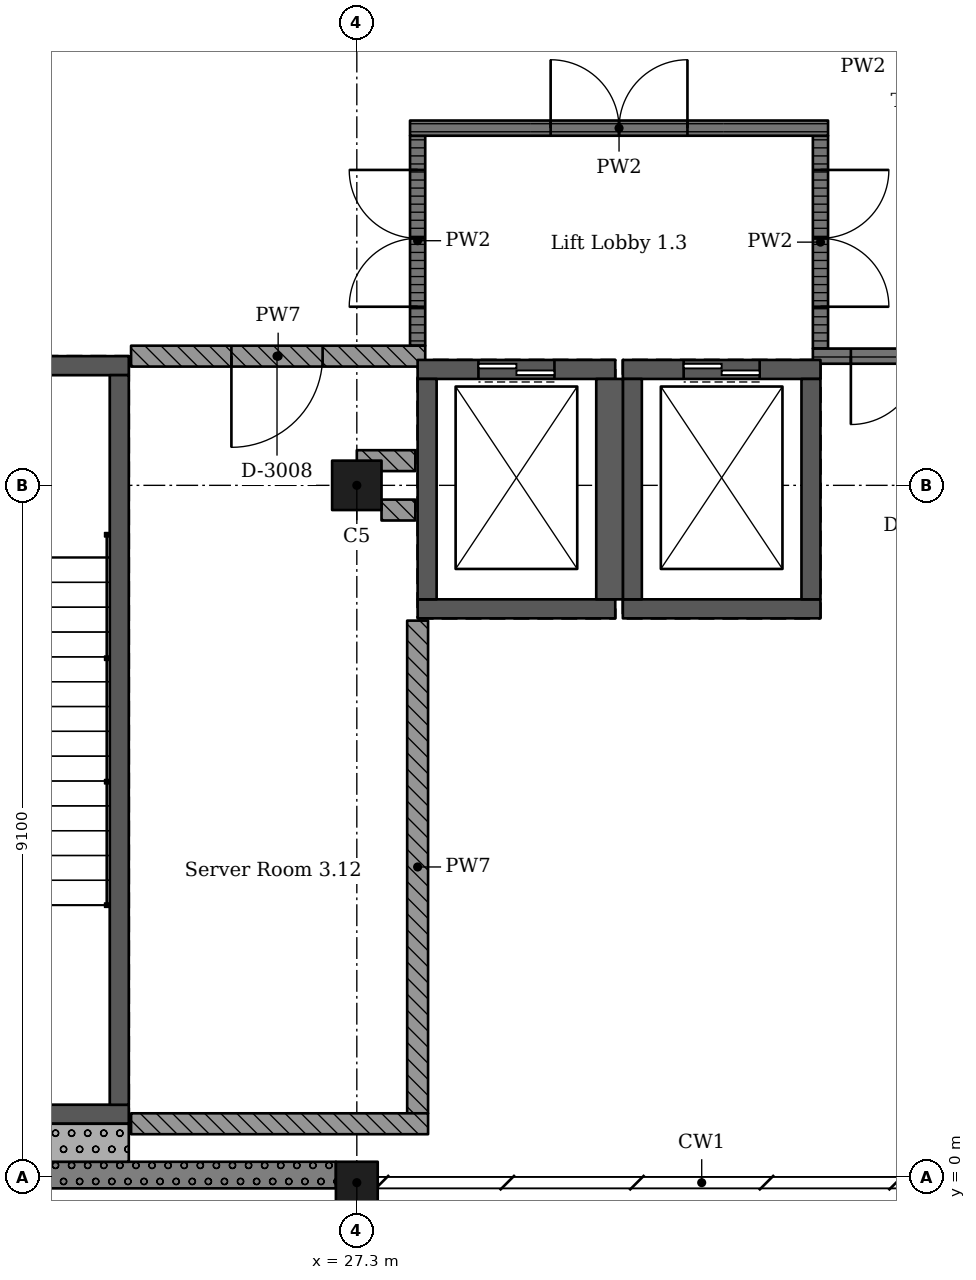
"""IFC4 building model, lengths in metres.
Left out: names, types, materials, properties, quantities, classifications, styles, units other than length and angle.
Written with IfcOpenShell. Run it as: python <this file> out.ifc"""

import sys

from ifc_helpers import new_model, si_unit, direction, frame, frame_2d, origin, origin_2d, place, context, subcontext, project, spatial, rectangle, extrude, element, fill, save


model = new_model("IFC4")
c1 = context("Model", 3, precision=1e-05, world=origin(), true_north=direction((0.0, 1.0)))
c2 = subcontext(c1, "Body", "Model", "MODEL_VIEW")
j1 = project(units=[si_unit("LENGTHUNIT", "METRE"), si_unit("PLANEANGLEUNIT", "RADIAN")], contexts=[c1])
p1 = place(None, origin())
s1 = spatial("IfcSite", under=j1, at=p1, CompositionType="ELEMENT")
p2 = place(p1, origin())
s2 = spatial("IfcBuilding", under=s1, at=p2, CompositionType="ELEMENT")
p3 = place(p2, frame((0.0, 0.0, 15.47)))
s3 = spatial("IfcBuildingStorey", under=s2, at=p3, CompositionType="ELEMENT", Elevation=15.47)
p4 = place(p3, frame((27.3, -0.075, 0.0), z_axis=(0.0, 0.0, 1.0), x_axis=(1.0, 0.0, 0.0)))
e1 = element("IfcColumn", 1, at=p4, inside=s3, PredefinedType="COLUMN", context=c2, shape_type="SweptSolid", body=[
    extrude(rectangle(XDim=0.55, YDim=0.55, at=origin_2d()), origin(), (0.0, 0.0, 1.0), 4.55),
])
p5 = place(p3, frame((27.3, 9.1, 0.0), z_axis=(0.0, 0.0, 1.0), x_axis=(1.0, 0.0, 0.0)))
e2 = element("IfcColumn", 2, at=p5, inside=s3, PredefinedType="COLUMN", context=c2, shape_type="SweptSolid", body=[
    extrude(rectangle(XDim=0.65, YDim=0.65, at=origin_2d()), origin(), (0.0, 0.0, 1.0), 4.55),
])
p6 = place(p3, frame((30.7, 7.475, 0.0), z_axis=(0.0, 0.0, 1.0), x_axis=(-1.0, 0.0, 0.0)))
e3 = element("IfcWall", 3, at=p6, inside=s3, PredefinedType="SHEAR", context=c2, shape_type="SweptSolid", body=[
    extrude(rectangle(XDim=2.6, YDim=0.25, at=frame_2d((1.3, 0.0))), origin(), (0.0, 0.0, 1.0), 4.55),
])
p7 = place(p3, frame((30.7, 10.625, 0.0), z_axis=(0.0, 0.0, 1.0), x_axis=(-1.0, 0.0, 0.0)))
e4 = element("IfcWall", 4, at=p7, inside=s3, PredefinedType="SHEAR", context=c2, shape_type="SweptSolid", body=[
    extrude(rectangle(XDim=2.6, YDim=0.25, at=frame_2d((1.3, 0.0))), origin(), (0.0, 0.0, 1.0), 4.55),
])
p8 = place(p7, frame((0.8, 0.0, 0.0)))
e5 = element("IfcOpeningElement", 5, at=p8, cuts=e4, PredefinedType="OPENING", context=c2, shape_type="SweptSolid", body=[
    extrude(rectangle(XDim=1.0, YDim=2.1, at=frame_2d((0.5, 1.05))), frame((0.0, 0.135, 0.0), z_axis=(0.0, -1.0, 0.0), x_axis=(1.0, 0.0, 0.0)), (0.0, 0.0, 1.0), 0.27),
])
p9 = place(p3, frame((28.225, 10.5, 0.0), z_axis=(0.0, 0.0, 1.0), x_axis=(0.0, -1.0, 0.0)))
e6 = element("IfcWall", 6, at=p9, inside=s3, PredefinedType="SHEAR", context=c2, shape_type="SweptSolid", body=[
    extrude(rectangle(XDim=2.9, YDim=0.25, at=frame_2d((1.45, 0.0))), origin(), (0.0, 0.0, 1.0), 4.55),
])
p10 = place(p3, frame((30.625, 10.5, 0.0), z_axis=(0.0, 0.0, 1.0), x_axis=(0.0, -1.0, 0.0)))
e7 = element("IfcWall", 7, at=p10, inside=s3, PredefinedType="SHEAR", context=c2, shape_type="SweptSolid", body=[
    extrude(rectangle(XDim=2.9, YDim=0.35, at=frame_2d((1.45, 0.0))), origin(), (0.0, 0.0, 1.0), 4.55),
])
p11 = place(p3, frame((33.4, 7.475, 0.0), z_axis=(0.0, 0.0, 1.0), x_axis=(-1.0, 0.0, 0.0)))
e8 = element("IfcWall", 8, at=p11, inside=s3, PredefinedType="SHEAR", context=c2, shape_type="SweptSolid", body=[
    extrude(rectangle(XDim=2.6, YDim=0.25, at=frame_2d((1.3, 0.0))), origin(), (0.0, 0.0, 1.0), 4.55),
])
p12 = place(p3, frame((33.4, 10.625, 0.0), z_axis=(0.0, 0.0, 1.0), x_axis=(-1.0, 0.0, 0.0)))
e9 = element("IfcWall", 9, at=p12, inside=s3, PredefinedType="SHEAR", context=c2, shape_type="SweptSolid", body=[
    extrude(rectangle(XDim=2.6, YDim=0.25, at=frame_2d((1.3, 0.0))), origin(), (0.0, 0.0, 1.0), 4.55),
])
p13 = place(p12, frame((0.8, 0.0, 0.0)))
e10 = element("IfcOpeningElement", 10, at=p13, cuts=e9, PredefinedType="OPENING", context=c2, shape_type="SweptSolid", body=[
    extrude(rectangle(XDim=1.0, YDim=2.1, at=frame_2d((0.5, 1.05))), frame((0.0, 0.135, 0.0), z_axis=(0.0, -1.0, 0.0), x_axis=(1.0, 0.0, 0.0)), (0.0, 0.0, 1.0), 0.27),
])
for number, where, z_axis, x_axis in (
    (11, (30.925, 10.5, 0.0), (0.0, 0.0, 1.0), (0.0, -1.0, 0.0)),
    (12, (33.275, 10.5, 0.0), (0.0, 0.0, 1.0), (0.0, -1.0, 0.0)),
):
    element("IfcWall", number, at=place(p3, frame(where, z_axis=z_axis, x_axis=x_axis)), inside=s3, PredefinedType="SHEAR", context=c2, shape_type="SweptSolid", body=[
        extrude(rectangle(XDim=2.9, YDim=0.25, at=frame_2d((1.45, 0.0))), origin(), (0.0, 0.0, 1.0), 4.55),
    ])
p14 = place(p3, frame((24.3, 0.825, 0.0), z_axis=(0.0, 0.0, 1.0), x_axis=(-1.0, 0.0, 0.0)))
e13 = element("IfcWall", 13, at=p14, inside=s3, PredefinedType="SHEAR", context=c2, shape_type="SweptSolid", body=[
    extrude(rectangle(XDim=5.4, YDim=0.25, at=frame_2d((2.7, 0.0))), origin(), (0.0, 0.0, 1.0), 4.55),
])
p15 = place(p3, frame((24.3, 10.675, 0.0), z_axis=(0.0, 0.0, 1.0), x_axis=(-1.0, 0.0, 0.0)))
e14 = element("IfcWall", 14, at=p15, inside=s3, PredefinedType="SHEAR", context=c2, shape_type="SweptSolid", body=[
    extrude(rectangle(XDim=5.4, YDim=0.25, at=frame_2d((2.7, 0.0))), origin(), (0.0, 0.0, 1.0), 4.55),
])
p16 = place(p15, frame((1.5, 0.0, 0.0)))
e15 = element("IfcOpeningElement", 15, at=p16, cuts=e14, PredefinedType="OPENING", context=c2, shape_type="SweptSolid", body=[
    extrude(rectangle(XDim=2.4, YDim=2.1, at=frame_2d((1.2, 1.05))), frame((0.0, 0.135, 0.0), z_axis=(0.0, -1.0, 0.0), x_axis=(1.0, 0.0, 0.0)), (0.0, 0.0, 1.0), 0.27),
])
p17 = place(p3, frame((24.175, 10.55, 0.0), z_axis=(0.0, 0.0, 1.0), x_axis=(0.0, -1.0, 0.0)))
e16 = element("IfcWall", 16, at=p17, inside=s3, PredefinedType="SHEAR", context=c2, shape_type="SweptSolid", body=[
    extrude(rectangle(XDim=9.6, YDim=0.25, at=frame_2d((4.8, 0.0))), origin(), (0.0, 0.0, 1.0), 4.55),
])
p18 = place(p3, frame((18.45, 0.025, 0.0), z_axis=(0.0, 0.0, 1.0), x_axis=(1.0, 0.0, 0.0)))
e17 = element("IfcWall", 17, at=p18, inside=s3, PredefinedType="SOLIDWALL", context=c2, shape_type="SweptSolid", body=[
    extrude(rectangle(XDim=8.575, YDim=0.35, at=frame_2d((4.288, 0.0))), origin(), (0.0, 0.0, 1.0), 3.55),
])
p19 = place(p3, frame((18.9, 0.45, 0.0), z_axis=(0.0, 0.0, 1.0), x_axis=(1.0, 0.0, 0.0)))
e18 = element("IfcWall", 18, at=p19, inside=s3, PredefinedType="SOLIDWALL", context=c2, shape_type="SweptSolid", body=[
    extrude(rectangle(XDim=5.4, YDim=0.5, at=frame_2d((2.7, 0.0))), origin(), (0.0, 0.0, 1.0), 4.3),
])
p20 = place(p3, frame((27.3, 9.425, 0.0), z_axis=(0.0, 0.0, 1.0), x_axis=(1.0, 0.0, 0.0)))
e19 = element("IfcWall", 19, at=p20, inside=s3, PredefinedType="SOLIDWALL", context=c2, shape_type="SweptSolid", body=[
    extrude(rectangle(XDim=0.77, YDim=0.275, at=frame_2d((0.385, 0.0))), origin(), (0.0, 0.0, 1.0), 4.3),
])
p21 = place(p3, frame((27.625, 8.775, 0.0), z_axis=(0.0, 0.0, 1.0), x_axis=(1.0, 0.0, 0.0)))
e20 = element("IfcWall", 20, at=p21, inside=s3, PredefinedType="SOLIDWALL", context=c2, shape_type="SweptSolid", body=[
    extrude(rectangle(XDim=0.445, YDim=0.275, at=frame_2d((0.223, 0.0))), origin(), (0.0, 0.0, 1.0), 4.3),
])
p22 = place(p3, frame((28.1, 7.32, 0.0), z_axis=(0.0, 0.0, 1.0), x_axis=(0.0, -1.0, 0.0)))
e21 = element("IfcWall", 21, at=p22, inside=s3, PredefinedType="SOLIDWALL", context=c2, shape_type="SweptSolid", body=[
    extrude(rectangle(XDim=6.483, YDim=0.275, at=frame_2d((3.241, 0.0))), origin(), (0.0, 0.0, 1.0), 4.3),
])
p23 = place(p3, frame((28.1, 13.7, 0.0), z_axis=(0.0, 0.0, 1.0), x_axis=(0.0, -1.0, 0.0)))
e22 = element("IfcWall", 22, at=p23, inside=s3, PredefinedType="PARTITIONING", context=c2, shape_type="SweptSolid", body=[
    extrude(rectangle(XDim=2.762, YDim=0.2, at=frame_2d((1.381, 0.0))), origin(), (0.0, 0.0, 1.0), 4.3),
])
p24 = place(p23, frame((0.45, 0.0, 0.0)))
e23 = element("IfcOpeningElement", 23, at=p24, cuts=e22, PredefinedType="OPENING", context=c2, shape_type="SweptSolid", body=[
    extrude(rectangle(XDim=1.8, YDim=2.4, at=frame_2d((0.9, 1.2))), frame((0.0, 0.11, 0.0), z_axis=(0.0, -1.0, 0.0), x_axis=(1.0, 0.0, 0.0)), (0.0, 0.0, 1.0), 0.22),
])
p25 = place(p3, frame((28.2, 10.8, 0.0), z_axis=(0.0, 0.0, 1.0), x_axis=(-1.0, 0.0, 0.0)))
e24 = element("IfcWall", 24, at=p25, inside=s3, PredefinedType="SOLIDWALL", context=c2, shape_type="SweptSolid", body=[
    extrude(rectangle(XDim=3.87, YDim=0.275, at=frame_2d((1.935, 0.0))), origin(), (0.0, 0.0, 1.0), 4.3),
])
p26 = place(p25, frame((1.35, 0.0, 0.0)))
e25 = element("IfcOpeningElement", 25, at=p26, cuts=e24, PredefinedType="OPENING", context=c2, shape_type="SweptSolid", body=[
    extrude(rectangle(XDim=1.2, YDim=2.4, at=frame_2d((0.6, 1.2))), frame((0.0, 0.147, 0.0), z_axis=(0.0, -1.0, 0.0), x_axis=(1.0, 0.0, 0.0)), (0.0, 0.0, 1.0), 0.295),
])
p27 = place(p3, frame((28.238, 0.7, 0.0), z_axis=(0.0, 0.0, 1.0), x_axis=(-1.0, 0.0, 0.0)))
e26 = element("IfcWall", 26, at=p27, inside=s3, PredefinedType="SOLIDWALL", context=c2, shape_type="SweptSolid", body=[
    extrude(rectangle(XDim=3.907, YDim=0.275, at=frame_2d((1.954, 0.0))), origin(), (0.0, 0.0, 1.0), 4.3),
])
p28 = place(p3, frame((33.4, 10.9, 0.0), z_axis=(0.0, 0.0, 1.0), x_axis=(0.0, 1.0, 0.0)))
e27 = element("IfcWall", 27, at=p28, inside=s3, PredefinedType="PARTITIONING", context=c2, shape_type="SweptSolid", body=[
    extrude(rectangle(XDim=2.8, YDim=0.2, at=frame_2d((1.4, 0.0))), origin(), (0.0, 0.0, 1.0), 4.3),
])
p29 = place(p28, frame((0.55, 0.0, 0.0)))
e28 = element("IfcOpeningElement", 28, at=p29, cuts=e27, PredefinedType="OPENING", context=c2, shape_type="SweptSolid", body=[
    extrude(rectangle(XDim=1.8, YDim=2.4, at=frame_2d((0.9, 1.2))), frame((0.0, 0.11, 0.0), z_axis=(0.0, -1.0, 0.0), x_axis=(1.0, 0.0, 0.0)), (0.0, 0.0, 1.0), 0.22),
])
p30 = place(p3, frame((33.5, 13.8, 0.0), z_axis=(0.0, 0.0, 1.0), x_axis=(-1.0, 0.0, 0.0)))
e29 = element("IfcWall", 29, at=p30, inside=s3, PredefinedType="PARTITIONING", context=c2, shape_type="SweptSolid", body=[
    extrude(rectangle(XDim=5.5, YDim=0.2, at=frame_2d((2.75, 0.0))), origin(), (0.0, 0.0, 1.0), 4.3),
])
p31 = place(p30, frame((1.85, 0.0, 0.0)))
e30 = element("IfcOpeningElement", 30, at=p31, cuts=e29, PredefinedType="OPENING", context=c2, shape_type="SweptSolid", body=[
    extrude(rectangle(XDim=1.8, YDim=2.4, at=frame_2d((0.9, 1.2))), frame((0.0, 0.11, 0.0), z_axis=(0.0, -1.0, 0.0), x_axis=(1.0, 0.0, 0.0)), (0.0, 0.0, 1.0), 0.22),
])
p32 = place(p3, frame((36.15, 10.8, 0.0), z_axis=(0.0, 0.0, 1.0), x_axis=(-1.0, 0.0, 0.0)))
e31 = element("IfcWall", 31, at=p32, inside=s3, PredefinedType="PARTITIONING", context=c2, shape_type="SweptSolid", body=[
    extrude(rectangle(XDim=2.85, YDim=0.2, at=frame_2d((1.425, 0.0))), origin(), (0.0, 0.0, 1.0), 4.3),
])
p33 = place(p32, frame((0.55, 0.0, 0.0)))
e32 = element("IfcOpeningElement", 32, at=p33, cuts=e31, PredefinedType="OPENING", context=c2, shape_type="SweptSolid", body=[
    extrude(rectangle(XDim=1.8, YDim=2.4, at=frame_2d((0.9, 1.2))), frame((0.0, 0.11, 0.0), z_axis=(0.0, -1.0, 0.0), x_axis=(1.0, 0.0, 0.0)), (0.0, 0.0, 1.0), 0.22),
])
p34 = place(p26, origin())
e33 = element("IfcDoor", 33, at=p34, inside=s3, OperationType="SINGLE_SWING_LEFT", PredefinedType="DOOR", context=c2, shape_type="SweptSolid", body=[
    extrude(rectangle(XDim=1.2, YDim=2.4, at=frame_2d((0.6, 1.2))), frame((0.0, 0.025, 0.0), z_axis=(0.0, -1.0, 0.0), x_axis=(1.0, 0.0, 0.0)), (0.0, 0.0, 1.0), 0.05),
])
fill(e25, e33)
p35 = place(p31, origin())
e34 = element("IfcDoor", 34, at=p35, inside=s3, OperationType="DOUBLE_DOOR_SINGLE_SWING", PredefinedType="DOOR", context=c2, shape_type="SweptSolid", body=[
    extrude(rectangle(XDim=1.8, YDim=2.4, at=frame_2d((0.9, 1.2))), frame((0.0, 0.025, 0.0), z_axis=(0.0, -1.0, 0.0), x_axis=(1.0, 0.0, 0.0)), (0.0, 0.0, 1.0), 0.05),
])
fill(e30, e34)
p36 = place(p29, origin())
e35 = element("IfcDoor", 35, at=p36, inside=s3, OperationType="DOUBLE_DOOR_SINGLE_SWING", PredefinedType="DOOR", context=c2, shape_type="SweptSolid", body=[
    extrude(rectangle(XDim=1.8, YDim=2.4, at=frame_2d((0.9, 1.2))), frame((0.0, 0.025, 0.0), z_axis=(0.0, -1.0, 0.0), x_axis=(1.0, 0.0, 0.0)), (0.0, 0.0, 1.0), 0.05),
])
fill(e28, e35)
p37 = place(p24, origin())
e36 = element("IfcDoor", 36, at=p37, inside=s3, OperationType="DOUBLE_DOOR_SINGLE_SWING", PredefinedType="DOOR", context=c2, shape_type="SweptSolid", body=[
    extrude(rectangle(XDim=1.8, YDim=2.4, at=frame_2d((0.9, 1.2))), frame((0.0, 0.025, 0.0), z_axis=(0.0, -1.0, 0.0), x_axis=(1.0, 0.0, 0.0)), (0.0, 0.0, 1.0), 0.05),
])
fill(e23, e36)
p38 = place(p33, origin())
e37 = element("IfcDoor", 37, at=p38, inside=s3, OperationType="DOUBLE_DOOR_SINGLE_SWING", PredefinedType="DOOR", context=c2, shape_type="SweptSolid", body=[
    extrude(rectangle(XDim=1.8, YDim=2.4, at=frame_2d((0.9, 1.2))), frame((0.0, 0.025, 0.0), z_axis=(0.0, -1.0, 0.0), x_axis=(1.0, 0.0, 0.0)), (0.0, 0.0, 1.0), 0.05),
])
fill(e32, e37)
p39 = place(p8, origin())
e38 = element("IfcDoor", 38, at=p39, inside=s3, OperationType="DOUBLE_DOOR_SLIDING", PredefinedType="DOOR", context=c2, shape_type="SweptSolid", body=[
    extrude(rectangle(XDim=1.0, YDim=2.1, at=frame_2d((0.5, 1.05))), frame((0.0, 0.025, 0.0), z_axis=(0.0, -1.0, 0.0), x_axis=(1.0, 0.0, 0.0)), (0.0, 0.0, 1.0), 0.05),
])
fill(e5, e38)
p40 = place(p13, origin())
e39 = element("IfcDoor", 39, at=p40, inside=s3, OperationType="DOUBLE_DOOR_SLIDING", PredefinedType="DOOR", context=c2, shape_type="SweptSolid", body=[
    extrude(rectangle(XDim=1.0, YDim=2.1, at=frame_2d((0.5, 1.05))), frame((0.0, 0.025, 0.0), z_axis=(0.0, -1.0, 0.0), x_axis=(1.0, 0.0, 0.0)), (0.0, 0.0, 1.0), 0.05),
])
fill(e10, e39)
save(model, sys.argv[1])
